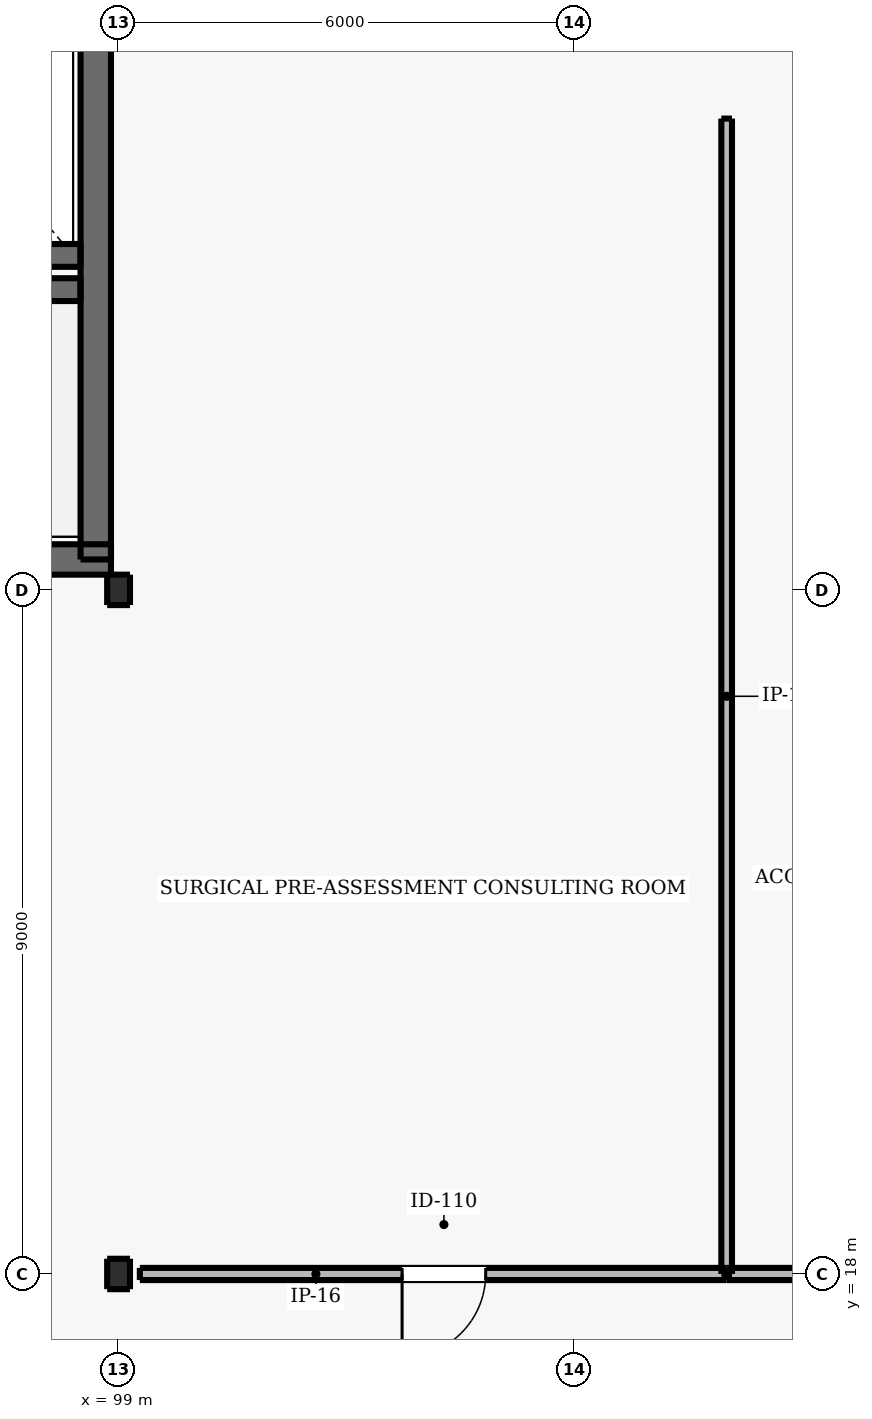
"""IFC4 building model, lengths in metres.
Left out: names, types, materials, properties, quantities, classifications, styles, units other than length and angle.
Written with IfcOpenShell. Run it as: python <this file> out.ifc"""

import sys

from ifc_helpers import new_model, si_unit, direction, frame, frame_2d, origin, origin_2d, place, context, subcontext, project, spatial, rectangle, i_section, extrude, element, fill, save


model = new_model("IFC4")
c1 = context("Model", 3, precision=1e-05, world=origin(), true_north=direction((0.0, 1.0)))
c2 = subcontext(c1, "Body", "Model", "MODEL_VIEW")
j1 = project(units=[si_unit("LENGTHUNIT", "METRE"), si_unit("PLANEANGLEUNIT", "RADIAN")], contexts=[c1])
p1 = place(None, origin())
s1 = spatial("IfcSite", under=j1, at=p1, CompositionType="ELEMENT")
p2 = place(p1, origin())
s2 = spatial("IfcBuilding", under=s1, at=p2, CompositionType="ELEMENT")
p3 = place(p2, frame((0.0, 0.0, 13.8)))
s3 = spatial("IfcBuildingStorey", under=s2, at=p3, CompositionType="ELEMENT", Elevation=13.8)
for number, where, z_axis, x_axis in (
    (1, (99.0, 18.0, 0.0), (0.0, 0.0, 1.0), (1.0, 0.0, 0.0)),
    (2, (99.0, 27.0, 0.0), (0.0, 0.0, 1.0), (1.0, 0.0, 0.0)),
):
    element("IfcColumn", number, at=place(p3, frame(where, z_axis=z_axis, x_axis=x_axis)), inside=s3, PredefinedType="COLUMN", context=c2, shape_type="SweptSolid", body=[
        extrude(i_section(OverallWidth=0.3, OverallDepth=0.4, WebThickness=0.013, FlangeThickness=0.024, FilletRadius=0.027, at=origin_2d()), origin(), (0.0, 0.0, 1.0), 4.2),
    ])
p4 = place(p3, frame((90.9, 27.4, 0.0), z_axis=(0.0, 0.0, 1.0), x_axis=(1.0, 0.0, 0.0)))
e3 = element("IfcWall", 3, at=p4, inside=s3, PredefinedType="SHEAR", context=c2, shape_type="SweptSolid", body=[
    extrude(rectangle(XDim=8.0, YDim=0.4, at=frame_2d((4.0, 0.0))), origin(), (0.0, 0.0, 1.0), 4.2),
])
p5 = place(p4, frame((0.45, 0.0, 0.0)))
e4 = element("IfcOpeningElement", 4, at=p5, cuts=e3, PredefinedType="OPENING", context=c2, shape_type="SweptSolid", body=[
    extrude(rectangle(XDim=1.3, YDim=2.15, at=frame_2d((0.65, 1.075))), frame((0.0, 0.21, 0.0), z_axis=(0.0, -1.0, 0.0), x_axis=(1.0, 0.0, 0.0)), (0.0, 0.0, 1.0), 0.42),
])
p6 = place(p3, frame((98.7, 27.4, 0.0), z_axis=(0.0, 0.0, 1.0), x_axis=(0.0, 1.0, 0.0)))
e5 = element("IfcWall", 5, at=p6, inside=s3, PredefinedType="SHEAR", context=c2, shape_type="SweptSolid", body=[
    extrude(rectangle(XDim=7.4, YDim=0.4, at=frame_2d((3.7, 0.0))), origin(), (0.0, 0.0, 1.0), 4.2),
])
p7 = place(p3, frame((91.3, 30.95, 0.0), z_axis=(0.0, 0.0, 1.0), x_axis=(1.0, 0.0, 0.0)))
e6 = element("IfcWall", 6, at=p7, inside=s3, PredefinedType="SHEAR", context=c2, shape_type="SweptSolid", body=[
    extrude(rectangle(XDim=7.2, YDim=0.3, at=frame_2d((3.6, 0.0))), origin(), (0.0, 0.0, 1.0), 4.2),
])
p8 = place(p3, frame((95.65, 31.4, 0.0), z_axis=(0.0, 0.0, 1.0), x_axis=(1.0, 0.0, 0.0)))
e7 = element("IfcWall", 7, at=p8, inside=s3, PredefinedType="SHEAR", context=c2, shape_type="SweptSolid", body=[
    extrude(rectangle(XDim=2.85, YDim=0.3, at=frame_2d((1.425, 0.0))), origin(), (0.0, 0.0, 1.0), 4.2),
])
p9 = place(p3, frame((99.28, 18.0, 0.0), z_axis=(0.0, 0.0, 1.0), x_axis=(1.0, 0.0, 0.0)))
e8 = element("IfcWall", 8, at=p9, inside=s3, PredefinedType="PARTITIONING", context=c2, shape_type="SweptSolid", body=[
    extrude(rectangle(XDim=7.72, YDim=0.16, at=frame_2d((3.86, 0.0))), origin(), (0.0, 0.0, 1.0), 3.49),
])
p10 = place(p9, frame((3.45, 0.0, 0.0)))
e9 = element("IfcOpeningElement", 9, at=p10, cuts=e8, PredefinedType="OPENING", context=c2, shape_type="SweptSolid", body=[
    extrude(rectangle(XDim=1.1, YDim=2.15, at=frame_2d((0.55, 1.075))), frame((0.0, 0.09, 0.0), z_axis=(0.0, -1.0, 0.0), x_axis=(1.0, 0.0, 0.0)), (0.0, 0.0, 1.0), 0.18),
])
p11 = place(p3, frame((107.0, 18.0, 0.0), z_axis=(0.0, 0.0, 1.0), x_axis=(0.0, 1.0, 0.0)))
e10 = element("IfcWall", 10, at=p11, inside=s3, PredefinedType="PARTITIONING", context=c2, shape_type="SweptSolid", body=[
    extrude(rectangle(XDim=15.2, YDim=0.14, at=frame_2d((7.6, 0.0))), origin(), (0.0, 0.0, 1.0), 3.45),
])
p12 = place(p3, frame((107.0, 18.0, 0.0), z_axis=(0.0, 0.0, 1.0), x_axis=(1.0, 0.0, 0.0)))
e11 = element("IfcWall", 11, at=p12, inside=s3, PredefinedType="PARTITIONING", context=c2, shape_type="SweptSolid", body=[
    extrude(rectangle(XDim=3.72, YDim=0.16, at=frame_2d((1.86, 0.0))), origin(), (0.0, 0.0, 1.0), 3.49),
])
p13 = place(p12, frame((1.525, 0.0, 0.0)))
e12 = element("IfcOpeningElement", 12, at=p13, cuts=e11, PredefinedType="OPENING", context=c2, shape_type="SweptSolid", body=[
    extrude(rectangle(XDim=0.95, YDim=2.1, at=frame_2d((0.475, 1.05))), frame((0.0, 0.09, 0.0), z_axis=(0.0, -1.0, 0.0), x_axis=(1.0, 0.0, 0.0)), (0.0, 0.0, 1.0), 0.18),
])
p14 = place(p10, frame((1.1, 0.0, 0.0), z_axis=(0.0, 0.0, 1.0), x_axis=(-1.0, 0.0, 0.0)))
e13 = element("IfcDoor", 13, at=p14, inside=s3, OperationType="SINGLE_SWING_LEFT", PredefinedType="DOOR", context=c2, shape_type="SweptSolid", body=[
    extrude(rectangle(XDim=1.1, YDim=2.15, at=frame_2d((0.55, 1.075))), frame((0.0, 0.025, 0.0), z_axis=(0.0, -1.0, 0.0), x_axis=(1.0, 0.0, 0.0)), (0.0, 0.0, 1.0), 0.05),
])
fill(e9, e13)
save(model, sys.argv[1])
